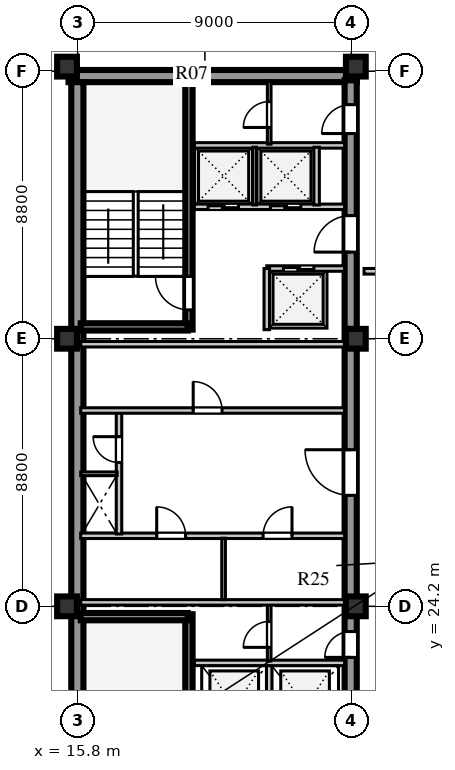
"""IFC4 building model, lengths in metres.
Left out: names, types, materials, properties, quantities, classifications, styles, units other than length and angle.
Written with IfcOpenShell. Run it as: python <this file> out.ifc"""

import sys

from ifc_helpers import new_model, si_unit, direction, frame, frame_2d, origin, origin_2d, place, context, subcontext, project, spatial, rectangle, extrude, element, fill, save


model = new_model("IFC4")
c1 = context("Model", 3, precision=1e-05, world=origin(), true_north=direction((0.0, 1.0)))
c2 = subcontext(c1, "Body", "Model", "MODEL_VIEW")
j1 = project(units=[si_unit("LENGTHUNIT", "METRE"), si_unit("PLANEANGLEUNIT", "RADIAN")], contexts=[c1])
p1 = place(None, origin())
s1 = spatial("IfcSite", under=j1, at=p1, CompositionType="ELEMENT")
p2 = place(p1, origin())
s2 = spatial("IfcBuilding", under=s1, at=p2, CompositionType="ELEMENT")
p3 = place(p2, frame((0.0, 0.0, 342.9)))
s3 = spatial("IfcBuildingStorey", under=s2, at=p3, CompositionType="ELEMENT", Elevation=342.9)
p4 = place(p3, frame((15.5, 41.64, 0.0), z_axis=(0.0, 0.0, 1.0), x_axis=(1.0, 0.0, 0.0)))
e1 = element("IfcWall", 1, at=p4, inside=s3, PredefinedType="SHEAR", context=c2, shape_type="SweptSolid", body=[
    extrude(rectangle(XDim=9.48, YDim=0.4, at=frame_2d((4.74, 0.0))), origin(), (0.0, 0.0, 1.0), 3.55),
])
p5 = place(p3, frame((15.79, 15.81, 0.0), z_axis=(0.0, 0.0, 1.0), x_axis=(0.0, 1.0, 0.0)))
e2 = element("IfcWall", 2, at=p5, inside=s3, PredefinedType="SHEAR", context=c2, shape_type="SweptSolid", body=[
    extrude(rectangle(XDim=25.63, YDim=0.4, at=frame_2d((12.815, 0.0))), origin(), (0.0, 0.0, 1.0), 3.55),
])
p6 = place(p3, frame((24.78, 15.74, 0.0), z_axis=(0.0, 0.0, 1.0), x_axis=(0.0, 1.0, 0.0)))
e3 = element("IfcWall", 3, at=p6, inside=s3, PredefinedType="SHEAR", context=c2, shape_type="SweptSolid", body=[
    extrude(rectangle(XDim=25.76, YDim=0.4, at=frame_2d((12.88, 0.0))), origin(), (0.0, 0.0, 1.0), 3.55),
])
p7 = place(p6, frame((1.61, 0.0, 0.0)))
e4 = element("IfcOpeningElement", 4, at=p7, cuts=e3, PredefinedType="OPENING", context=c2, shape_type="SweptSolid", body=[
    extrude(rectangle(XDim=1.2, YDim=2.1, at=frame_2d((0.6, 1.05))), frame((0.0, 0.21, 0.0), z_axis=(0.0, -1.0, 0.0), x_axis=(1.0, 0.0, 0.0)), (0.0, 0.0, 1.0), 0.42),
])
p8 = place(p6, frame((6.78, 0.0, 0.0)))
e5 = element("IfcOpeningElement", 5, at=p8, cuts=e3, PredefinedType="OPENING", context=c2, shape_type="SweptSolid", body=[
    extrude(rectangle(XDim=0.85, YDim=2.06, at=frame_2d((0.425, 1.03))), frame((0.0, 0.21, 0.0), z_axis=(0.0, -1.0, 0.0), x_axis=(1.0, 0.0, 0.0)), (0.0, 0.0, 1.0), 0.42),
])
p9 = place(p6, frame((12.11, 0.0, 0.0)))
e6 = element("IfcOpeningElement", 6, at=p9, cuts=e3, PredefinedType="OPENING", context=c2, shape_type="SweptSolid", body=[
    extrude(rectangle(XDim=1.5, YDim=2.12, at=frame_2d((0.75, 1.06))), frame((0.0, 0.21, 0.0), z_axis=(0.0, -1.0, 0.0), x_axis=(1.0, 0.0, 0.0)), (0.0, 0.0, 1.0), 0.42),
])
p10 = place(p6, frame((20.11, 0.0, 0.0)))
e7 = element("IfcOpeningElement", 7, at=p10, cuts=e3, PredefinedType="OPENING", context=c2, shape_type="SweptSolid", body=[
    extrude(rectangle(XDim=1.2, YDim=2.12, at=frame_2d((0.6, 1.06))), frame((0.0, 0.21, 0.0), z_axis=(0.0, -1.0, 0.0), x_axis=(1.0, 0.0, 0.0)), (0.0, 0.0, 1.0), 0.42),
])
p11 = place(p6, frame((24.01, 0.0, 0.0)))
e8 = element("IfcOpeningElement", 8, at=p11, cuts=e3, PredefinedType="OPENING", context=c2, shape_type="SweptSolid", body=[
    extrude(rectangle(XDim=0.95, YDim=2.1, at=frame_2d((0.475, 1.05))), frame((0.0, 0.21, 0.0), z_axis=(0.0, -1.0, 0.0), x_axis=(1.0, 0.0, 0.0)), (0.0, 0.0, 1.0), 0.42),
])
for number, where, z_axis, x_axis in (
    (9, (15.45, 24.2, 0.0), (0.0, 0.0, 1.0), (1.0, 0.0, 0.0)),
    (10, (15.45, 33.0, 0.0), (0.0, 0.0, 1.0), (1.0, 0.0, 0.0)),
    (11, (15.45, 41.95, 0.0), (0.0, 0.0, 1.0), (1.0, 0.0, 0.0)),
    (12, (24.95, 24.2, 0.0), (0.0, 0.0, 1.0), (1.0, 0.0, 0.0)),
    (13, (24.95, 33.0, 0.0), (0.0, 0.0, 1.0), (1.0, 0.0, 0.0)),
    (14, (24.95, 41.95, 0.0), (0.0, 0.0, 1.0), (1.0, 0.0, 0.0)),
):
    element("IfcColumn", number, at=place(p3, frame(where, z_axis=z_axis, x_axis=x_axis)), inside=s3, PredefinedType="COLUMN", context=c2, shape_type="SweptSolid", body=[
        extrude(rectangle(XDim=0.65, YDim=0.65, at=origin_2d()), origin(), (0.0, 0.0, 1.0), 3.55),
    ])
p12 = place(p3, frame((19.46, 15.74, 0.0), z_axis=(0.0, 0.0, 1.0), x_axis=(0.0, 1.0, 0.0)))
e15 = element("IfcWall", 15, at=p12, inside=s3, PredefinedType="SHEAR", context=c2, shape_type="SweptSolid", body=[
    extrude(rectangle(XDim=8.2, YDim=0.24, at=frame_2d((4.1, 0.0))), origin(), (0.0, 0.0, 1.0), 3.8),
])
p13 = place(p12, frame((0.45, 0.0, 0.0)))
e16 = element("IfcOpeningElement", 16, at=p13, cuts=e15, PredefinedType="OPENING", context=c2, shape_type="SweptSolid", body=[
    extrude(rectangle(XDim=1.1, YDim=2.1, at=frame_2d((0.55, 1.05))), frame((0.0, 0.13, 0.0), z_axis=(0.0, -1.0, 0.0), x_axis=(1.0, 0.0, 0.0)), (0.0, 0.0, 1.0), 0.26),
])
p14 = place(p3, frame((15.9, 23.86, 0.0), z_axis=(0.0, 0.0, 1.0), x_axis=(1.0, 0.0, 0.0)))
e17 = element("IfcWall", 17, at=p14, inside=s3, PredefinedType="SHEAR", context=c2, shape_type="SweptSolid", body=[
    extrude(rectangle(XDim=3.52, YDim=0.24, at=frame_2d((1.76, 0.0))), origin(), (0.0, 0.0, 1.0), 3.8),
])
p15 = place(p3, frame((22.1, 19.51, 0.0), z_axis=(0.0, 0.0, 1.0), x_axis=(0.0, 1.0, 0.0)))
e18 = element("IfcWall", 18, at=p15, inside=s3, PredefinedType="SOLIDWALL", context=c2, shape_type="SweptSolid", body=[
    extrude(rectangle(XDim=2.74, YDim=0.18, at=frame_2d((1.37, 0.0))), origin(), (0.0, 0.0, 1.0), 3.55),
])
p16 = place(p3, frame((19.64, 22.34, 0.0), z_axis=(0.0, 0.0, 1.0), x_axis=(1.0, 0.0, 0.0)))
e19 = element("IfcWall", 19, at=p16, inside=s3, PredefinedType="SOLIDWALL", context=c2, shape_type="SweptSolid", body=[
    extrude(rectangle(XDim=4.94, YDim=0.18, at=frame_2d((2.47, 0.0))), origin(), (0.0, 0.0, 1.0), 3.55),
])
p17 = place(p3, frame((22.1, 22.4, 0.0), z_axis=(0.0, 0.0, 1.0), x_axis=(0.0, 1.0, 0.0)))
e20 = element("IfcWall", 20, at=p17, inside=s3, PredefinedType="PARTITIONING", context=c2, shape_type="SweptSolid", body=[
    extrude(rectangle(XDim=1.88, YDim=0.12, at=frame_2d((0.94, 0.0))), origin(), (0.0, 0.0, 1.0), 3.55),
])
p18 = place(p17, frame((0.45, 0.0, 0.0)))
e21 = element("IfcOpeningElement", 21, at=p18, cuts=e20, PredefinedType="OPENING", context=c2, shape_type="SweptSolid", body=[
    extrude(rectangle(XDim=0.85, YDim=2.06, at=frame_2d((0.425, 1.03))), frame((0.0, 0.07, 0.0), z_axis=(0.0, -1.0, 0.0), x_axis=(1.0, 0.0, 0.0)), (0.0, 0.0, 1.0), 0.14),
])
p19 = place(p3, frame((15.9, 26.52, 0.0), z_axis=(0.0, 0.0, 1.0), x_axis=(1.0, 0.0, 0.0)))
e22 = element("IfcWall", 22, at=p19, inside=s3, PredefinedType="SOLIDWALL", context=c2, shape_type="SweptSolid", body=[
    extrude(rectangle(XDim=8.68, YDim=0.18, at=frame_2d((4.34, 0.0))), origin(), (0.0, 0.0, 1.0), 3.55),
])
p20 = place(p19, frame((2.5, 0.0, 0.0)))
e23 = element("IfcOpeningElement", 23, at=p20, cuts=e22, PredefinedType="OPENING", context=c2, shape_type="SweptSolid", body=[
    extrude(rectangle(XDim=0.95, YDim=2.1, at=frame_2d((0.475, 1.05))), frame((0.0, 0.1, 0.0), z_axis=(0.0, -1.0, 0.0), x_axis=(1.0, 0.0, 0.0)), (0.0, 0.0, 1.0), 0.2),
])
p21 = place(p19, frame((6.0, 0.0, 0.0)))
e24 = element("IfcOpeningElement", 24, at=p21, cuts=e22, PredefinedType="OPENING", context=c2, shape_type="SweptSolid", body=[
    extrude(rectangle(XDim=0.95, YDim=2.1, at=frame_2d((0.475, 1.05))), frame((0.0, 0.1, 0.0), z_axis=(0.0, -1.0, 0.0), x_axis=(1.0, 0.0, 0.0)), (0.0, 0.0, 1.0), 0.2),
])
p22 = place(p3, frame((15.9, 24.33, 0.0), z_axis=(0.0, 0.0, 1.0), x_axis=(1.0, 0.0, 0.0)))
e25 = element("IfcWall", 25, at=p22, inside=s3, PredefinedType="SOLIDWALL", context=c2, shape_type="SweptSolid", body=[
    extrude(rectangle(XDim=8.68, YDim=0.18, at=frame_2d((4.34, 0.0))), origin(), (0.0, 0.0, 1.0), 2.95),
])
p23 = place(p3, frame((20.6, 24.42, 0.0), z_axis=(0.0, 0.0, 1.0), x_axis=(0.0, 1.0, 0.0)))
e26 = element("IfcWall", 26, at=p23, inside=s3, PredefinedType="PARTITIONING", context=c2, shape_type="SweptSolid", body=[
    extrude(rectangle(XDim=2.02, YDim=0.12, at=frame_2d((1.01, 0.0))), origin(), (0.0, 0.0, 1.0), 3.55),
])
p24 = place(p3, frame((17.16, 26.58, 0.0), z_axis=(0.0, 0.0, 1.0), x_axis=(0.0, 1.0, 0.0)))
e27 = element("IfcWall", 27, at=p24, inside=s3, PredefinedType="SOLIDWALL", context=c2, shape_type="SweptSolid", body=[
    extrude(rectangle(XDim=4.02, YDim=0.18, at=frame_2d((2.01, 0.0))), origin(), (0.0, 0.0, 1.0), 3.55),
])
p25 = place(p24, frame((2.35, 0.0, 0.0)))
e28 = element("IfcOpeningElement", 28, at=p25, cuts=e27, PredefinedType="OPENING", context=c2, shape_type="SweptSolid", body=[
    extrude(rectangle(XDim=0.85, YDim=2.06, at=frame_2d((0.425, 1.03))), frame((0.0, 0.1, 0.0), z_axis=(0.0, -1.0, 0.0), x_axis=(1.0, 0.0, 0.0)), (0.0, 0.0, 1.0), 0.2),
])
p26 = place(p3, frame((15.9, 28.56, 0.0), z_axis=(0.0, 0.0, 1.0), x_axis=(1.0, 0.0, 0.0)))
e29 = element("IfcWall", 29, at=p26, inside=s3, PredefinedType="PARTITIONING", context=c2, shape_type="SweptSolid", body=[
    extrude(rectangle(XDim=1.2, YDim=0.12, at=frame_2d((0.6, 0.0))), origin(), (0.0, 0.0, 1.0), 3.55),
])
p27 = place(p3, frame((15.9, 30.64, 0.0), z_axis=(0.0, 0.0, 1.0), x_axis=(1.0, 0.0, 0.0)))
e30 = element("IfcWall", 30, at=p27, inside=s3, PredefinedType="SOLIDWALL", context=c2, shape_type="SweptSolid", body=[
    extrude(rectangle(XDim=8.68, YDim=0.18, at=frame_2d((4.34, 0.0))), origin(), (0.0, 0.0, 1.0), 3.55),
])
p28 = place(p27, frame((3.7, 0.0, 0.0)))
e31 = element("IfcOpeningElement", 31, at=p28, cuts=e30, PredefinedType="OPENING", context=c2, shape_type="SweptSolid", body=[
    extrude(rectangle(XDim=0.95, YDim=2.1, at=frame_2d((0.475, 1.05))), frame((0.0, 0.1, 0.0), z_axis=(0.0, -1.0, 0.0), x_axis=(1.0, 0.0, 0.0)), (0.0, 0.0, 1.0), 0.2),
])
p29 = place(p3, frame((15.9, 32.82, 0.0), z_axis=(0.0, 0.0, 1.0), x_axis=(1.0, 0.0, 0.0)))
e32 = element("IfcWall", 32, at=p29, inside=s3, PredefinedType="SOLIDWALL", context=c2, shape_type="SweptSolid", body=[
    extrude(rectangle(XDim=8.68, YDim=0.18, at=frame_2d((4.34, 0.0))), origin(), (0.0, 0.0, 1.0), 2.95),
])
p30 = place(p3, frame((19.46, 33.3, 0.0), z_axis=(0.0, 0.0, 1.0), x_axis=(0.0, 1.0, 0.0)))
e33 = element("IfcWall", 33, at=p30, inside=s3, PredefinedType="SHEAR", context=c2, shape_type="SweptSolid", body=[
    extrude(rectangle(XDim=8.18, YDim=0.24, at=frame_2d((4.09, 0.0))), origin(), (0.0, 0.0, 1.0), 3.8),
])
p31 = place(p30, frame((0.65, 0.0, 0.0)))
e34 = element("IfcOpeningElement", 34, at=p31, cuts=e33, PredefinedType="OPENING", context=c2, shape_type="SweptSolid", body=[
    extrude(rectangle(XDim=1.1, YDim=2.1, at=frame_2d((0.55, 1.05))), frame((0.0, 0.13, 0.0), z_axis=(0.0, -1.0, 0.0), x_axis=(1.0, 0.0, 0.0)), (0.0, 0.0, 1.0), 0.26),
])
p32 = place(p3, frame((15.9, 33.39, 0.0), z_axis=(0.0, 0.0, 1.0), x_axis=(1.0, 0.0, 0.0)))
e35 = element("IfcWall", 35, at=p32, inside=s3, PredefinedType="SHEAR", context=c2, shape_type="SweptSolid", body=[
    extrude(rectangle(XDim=3.52, YDim=0.24, at=frame_2d((1.76, 0.0))), origin(), (0.0, 0.0, 1.0), 3.8),
])
p33 = place(p3, frame((22.02, 35.31, 0.0), z_axis=(0.0, 0.0, 1.0), x_axis=(1.0, 0.0, 0.0)))
e36 = element("IfcWall", 36, at=p33, inside=s3, PredefinedType="SOLIDWALL", context=c2, shape_type="SweptSolid", body=[
    extrude(rectangle(XDim=2.56, YDim=0.18, at=frame_2d((1.28, 0.0))), origin(), (0.0, 0.0, 1.0), 3.55),
])
p34 = place(p33, frame((0.55, 0.0, 0.0)))
e37 = element("IfcOpeningElement", 37, at=p34, cuts=e36, PredefinedType="OPENING", context=c2, shape_type="SweptSolid", body=[
    extrude(rectangle(XDim=1.0, YDim=2.1, at=frame_2d((0.5, 1.05))), frame((0.0, 0.1, 0.0), z_axis=(0.0, -1.0, 0.0), x_axis=(1.0, 0.0, 0.0)), (0.0, 0.0, 1.0), 0.2),
])
p35 = place(p3, frame((22.02, 33.3, 0.0), z_axis=(0.0, 0.0, 1.0), x_axis=(0.0, 1.0, 0.0)))
e38 = element("IfcWall", 38, at=p35, inside=s3, PredefinedType="SOLIDWALL", context=c2, shape_type="SweptSolid", body=[
    extrude(rectangle(XDim=2.01, YDim=0.18, at=frame_2d((1.005, 0.0))), origin(), (0.0, 0.0, 1.0), 3.55),
])
p36 = place(p3, frame((19.64, 37.34, 0.0), z_axis=(0.0, 0.0, 1.0), x_axis=(1.0, 0.0, 0.0)))
e39 = element("IfcWall", 39, at=p36, inside=s3, PredefinedType="SOLIDWALL", context=c2, shape_type="SweptSolid", body=[
    extrude(rectangle(XDim=4.94, YDim=0.18, at=frame_2d((2.47, 0.0))), origin(), (0.0, 0.0, 1.0), 3.55),
])
p37 = place(p36, frame((0.45, 0.0, 0.0)))
e40 = element("IfcOpeningElement", 40, at=p37, cuts=e39, PredefinedType="OPENING", context=c2, shape_type="SweptSolid", body=[
    extrude(rectangle(XDim=1.0, YDim=2.1, at=frame_2d((0.5, 1.05))), frame((0.0, 0.1, 0.0), z_axis=(0.0, -1.0, 0.0), x_axis=(1.0, 0.0, 0.0)), (0.0, 0.0, 1.0), 0.2),
])
p38 = place(p36, frame((2.5, 0.0, 0.0)))
e41 = element("IfcOpeningElement", 41, at=p38, cuts=e39, PredefinedType="OPENING", context=c2, shape_type="SweptSolid", body=[
    extrude(rectangle(XDim=1.0, YDim=2.1, at=frame_2d((0.5, 1.05))), frame((0.0, 0.1, 0.0), z_axis=(0.0, -1.0, 0.0), x_axis=(1.0, 0.0, 0.0)), (0.0, 0.0, 1.0), 0.2),
])
p39 = place(p3, frame((19.64, 39.36, 0.0), z_axis=(0.0, 0.0, 1.0), x_axis=(1.0, 0.0, 0.0)))
e42 = element("IfcWall", 42, at=p39, inside=s3, PredefinedType="SOLIDWALL", context=c2, shape_type="SweptSolid", body=[
    extrude(rectangle(XDim=4.94, YDim=0.18, at=frame_2d((2.47, 0.0))), origin(), (0.0, 0.0, 1.0), 3.55),
])
p40 = place(p3, frame((21.62, 37.4, 0.0), z_axis=(0.0, 0.0, 1.0), x_axis=(0.0, 1.0, 0.0)))
e43 = element("IfcWall", 43, at=p40, inside=s3, PredefinedType="PARTITIONING", context=c2, shape_type="SweptSolid", body=[
    extrude(rectangle(XDim=1.9, YDim=0.12, at=frame_2d((0.95, 0.0))), origin(), (0.0, 0.0, 1.0), 3.55),
])
p41 = place(p3, frame((23.66, 37.4, 0.0), z_axis=(0.0, 0.0, 1.0), x_axis=(0.0, 1.0, 0.0)))
e44 = element("IfcWall", 44, at=p41, inside=s3, PredefinedType="SOLIDWALL", context=c2, shape_type="SweptSolid", body=[
    extrude(rectangle(XDim=1.9, YDim=0.18, at=frame_2d((0.95, 0.0))), origin(), (0.0, 0.0, 1.0), 3.55),
])
p42 = place(p3, frame((22.1, 39.4, 0.0), z_axis=(0.0, 0.0, 1.0), x_axis=(0.0, 1.0, 0.0)))
e45 = element("IfcWall", 45, at=p42, inside=s3, PredefinedType="PARTITIONING", context=c2, shape_type="SweptSolid", body=[
    extrude(rectangle(XDim=2.08, YDim=0.12, at=frame_2d((1.04, 0.0))), origin(), (0.0, 0.0, 1.0), 3.55),
])
p43 = place(p42, frame((0.55, 0.0, 0.0)))
e46 = element("IfcOpeningElement", 46, at=p43, cuts=e45, PredefinedType="OPENING", context=c2, shape_type="SweptSolid", body=[
    extrude(rectangle(XDim=0.85, YDim=2.06, at=frame_2d((0.425, 1.03))), frame((0.0, 0.07, 0.0), z_axis=(0.0, -1.0, 0.0), x_axis=(1.0, 0.0, 0.0)), (0.0, 0.0, 1.0), 0.14),
])
p44 = place(p3, frame((25.22, 35.22, 0.0), z_axis=(0.0, 0.0, 1.0), x_axis=(1.0, 0.0, 0.0)))
e47 = element("IfcWall", 47, at=p44, inside=s3, PredefinedType="SOLIDWALL", context=c2, shape_type="SweptSolid", body=[
    extrude(rectangle(XDim=9.5, YDim=0.185, at=frame_2d((4.75, 0.0))), origin(), (0.0, 0.0, 1.0), 3.55),
])
p45 = place(p44, frame((2.4, 0.0, 0.0)))
e48 = element("IfcOpeningElement", 48, at=p45, cuts=e47, PredefinedType="OPENING", context=c2, shape_type="SweptSolid", body=[
    extrude(rectangle(XDim=0.95, YDim=2.08, at=frame_2d((0.475, 1.04))), frame((0.0, 0.103, 0.0), z_axis=(0.0, -1.0, 0.0), x_axis=(1.0, 0.0, 0.0)), (0.0, 0.0, 1.0), 0.205),
])
p46 = place(p44, frame((6.2, 0.0, 0.0)))
e49 = element("IfcOpeningElement", 49, at=p46, cuts=e47, PredefinedType="OPENING", context=c2, shape_type="SweptSolid", body=[
    extrude(rectangle(XDim=0.95, YDim=2.08, at=frame_2d((0.475, 1.04))), frame((0.0, 0.103, 0.0), z_axis=(0.0, -1.0, 0.0), x_axis=(1.0, 0.0, 0.0)), (0.0, 0.0, 1.0), 0.205),
])
p47 = place(p18, origin())
e50 = element("IfcDoor", 50, at=p47, inside=s3, OperationType="SINGLE_SWING_LEFT", PredefinedType="DOOR", context=c2, shape_type="SweptSolid", body=[
    extrude(rectangle(XDim=0.85, YDim=2.06, at=frame_2d((0.425, 1.03))), frame((0.0, 0.025, 0.0), z_axis=(0.0, -1.0, 0.0), x_axis=(1.0, 0.0, 0.0)), (0.0, 0.0, 1.0), 0.05),
])
fill(e21, e50)
p48 = place(p8, frame((0.85, 0.0, 0.0), z_axis=(0.0, 0.0, 1.0), x_axis=(-1.0, 0.0, 0.0)))
e51 = element("IfcDoor", 51, at=p48, inside=s3, OperationType="SINGLE_SWING_RIGHT", PredefinedType="DOOR", context=c2, shape_type="SweptSolid", body=[
    extrude(rectangle(XDim=0.85, YDim=2.06, at=frame_2d((0.425, 1.03))), frame((0.0, 0.025, 0.0), z_axis=(0.0, -1.0, 0.0), x_axis=(1.0, 0.0, 0.0)), (0.0, 0.0, 1.0), 0.05),
])
fill(e5, e51)
p49 = place(p20, origin())
e52 = element("IfcDoor", 52, at=p49, inside=s3, OperationType="SINGLE_SWING_LEFT", PredefinedType="DOOR", context=c2, shape_type="SweptSolid", body=[
    extrude(rectangle(XDim=0.95, YDim=2.1, at=frame_2d((0.475, 1.05))), frame((0.0, 0.025, 0.0), z_axis=(0.0, -1.0, 0.0), x_axis=(1.0, 0.0, 0.0)), (0.0, 0.0, 1.0), 0.05),
])
fill(e23, e52)
p50 = place(p21, origin())
e53 = element("IfcDoor", 53, at=p50, inside=s3, OperationType="SINGLE_SWING_RIGHT", PredefinedType="DOOR", context=c2, shape_type="SweptSolid", body=[
    extrude(rectangle(XDim=0.95, YDim=2.1, at=frame_2d((0.475, 1.05))), frame((0.0, 0.025, 0.0), z_axis=(0.0, -1.0, 0.0), x_axis=(1.0, 0.0, 0.0)), (0.0, 0.0, 1.0), 0.05),
])
fill(e24, e53)
p51 = place(p25, origin())
e54 = element("IfcDoor", 54, at=p51, inside=s3, OperationType="SINGLE_SWING_RIGHT", PredefinedType="DOOR", context=c2, shape_type="SweptSolid", body=[
    extrude(rectangle(XDim=0.85, YDim=2.06, at=frame_2d((0.425, 1.03))), frame((0.0, 0.025, 0.0), z_axis=(0.0, -1.0, 0.0), x_axis=(1.0, 0.0, 0.0)), (0.0, 0.0, 1.0), 0.05),
])
fill(e28, e54)
p52 = place(p9, frame((1.5, 0.0, 0.0), z_axis=(0.0, 0.0, 1.0), x_axis=(-1.0, 0.0, 0.0)))
e55 = element("IfcDoor", 55, at=p52, inside=s3, OperationType="SINGLE_SWING_LEFT", PredefinedType="DOOR", context=c2, shape_type="SweptSolid", body=[
    extrude(rectangle(XDim=1.5, YDim=2.12, at=frame_2d((0.75, 1.06))), frame((0.0, 0.025, 0.0), z_axis=(0.0, -1.0, 0.0), x_axis=(1.0, 0.0, 0.0)), (0.0, 0.0, 1.0), 0.05),
])
fill(e6, e55)
p53 = place(p28, frame((0.95, 0.0, 0.0), z_axis=(0.0, 0.0, 1.0), x_axis=(-1.0, 0.0, 0.0)))
e56 = element("IfcDoor", 56, at=p53, inside=s3, OperationType="SINGLE_SWING_RIGHT", PredefinedType="DOOR", context=c2, shape_type="SweptSolid", body=[
    extrude(rectangle(XDim=0.95, YDim=2.1, at=frame_2d((0.475, 1.05))), frame((0.0, 0.025, 0.0), z_axis=(0.0, -1.0, 0.0), x_axis=(1.0, 0.0, 0.0)), (0.0, 0.0, 1.0), 0.05),
])
fill(e31, e56)
p54 = place(p31, origin())
e57 = element("IfcDoor", 57, at=p54, inside=s3, OperationType="SINGLE_SWING_RIGHT", PredefinedType="DOOR", context=c2, shape_type="SweptSolid", body=[
    extrude(rectangle(XDim=1.1, YDim=2.1, at=frame_2d((0.55, 1.05))), frame((0.0, 0.025, 0.0), z_axis=(0.0, -1.0, 0.0), x_axis=(1.0, 0.0, 0.0)), (0.0, 0.0, 1.0), 0.05),
])
fill(e34, e57)
p55 = place(p10, frame((1.2, 0.0, 0.0), z_axis=(0.0, 0.0, 1.0), x_axis=(-1.0, 0.0, 0.0)))
e58 = element("IfcDoor", 58, at=p55, inside=s3, OperationType="SINGLE_SWING_RIGHT", PredefinedType="DOOR", context=c2, shape_type="SweptSolid", body=[
    extrude(rectangle(XDim=1.2, YDim=2.12, at=frame_2d((0.6, 1.06))), frame((0.0, 0.025, 0.0), z_axis=(0.0, -1.0, 0.0), x_axis=(1.0, 0.0, 0.0)), (0.0, 0.0, 1.0), 0.05),
])
fill(e7, e58)
p56 = place(p37, frame((1.0, 0.0, 0.0), z_axis=(0.0, 0.0, 1.0), x_axis=(-1.0, 0.0, 0.0)))
e59 = element("IfcDoor", 59, at=p56, inside=s3, OperationType="DOUBLE_DOOR_SLIDING", PredefinedType="DOOR", context=c2, shape_type="SweptSolid", body=[
    extrude(rectangle(XDim=1.0, YDim=2.1, at=frame_2d((0.5, 1.05))), frame((0.0, 0.025, 0.0), z_axis=(0.0, -1.0, 0.0), x_axis=(1.0, 0.0, 0.0)), (0.0, 0.0, 1.0), 0.05),
])
fill(e40, e59)
p57 = place(p38, frame((1.0, 0.0, 0.0), z_axis=(0.0, 0.0, 1.0), x_axis=(-1.0, 0.0, 0.0)))
e60 = element("IfcDoor", 60, at=p57, inside=s3, OperationType="DOUBLE_DOOR_SLIDING", PredefinedType="DOOR", context=c2, shape_type="SweptSolid", body=[
    extrude(rectangle(XDim=1.0, YDim=2.1, at=frame_2d((0.5, 1.05))), frame((0.0, 0.025, 0.0), z_axis=(0.0, -1.0, 0.0), x_axis=(1.0, 0.0, 0.0)), (0.0, 0.0, 1.0), 0.05),
])
fill(e41, e60)
p58 = place(p34, origin())
e61 = element("IfcDoor", 61, at=p58, inside=s3, OperationType="DOUBLE_DOOR_SLIDING", PredefinedType="DOOR", context=c2, shape_type="SweptSolid", body=[
    extrude(rectangle(XDim=1.0, YDim=2.1, at=frame_2d((0.5, 1.05))), frame((0.0, 0.025, 0.0), z_axis=(0.0, -1.0, 0.0), x_axis=(1.0, 0.0, 0.0)), (0.0, 0.0, 1.0), 0.05),
])
fill(e37, e61)
p59 = place(p43, origin())
e62 = element("IfcDoor", 62, at=p59, inside=s3, OperationType="SINGLE_SWING_LEFT", PredefinedType="DOOR", context=c2, shape_type="SweptSolid", body=[
    extrude(rectangle(XDim=0.85, YDim=2.06, at=frame_2d((0.425, 1.03))), frame((0.0, 0.025, 0.0), z_axis=(0.0, -1.0, 0.0), x_axis=(1.0, 0.0, 0.0)), (0.0, 0.0, 1.0), 0.05),
])
fill(e46, e62)
p60 = place(p11, frame((0.95, 0.0, 0.0), z_axis=(0.0, 0.0, 1.0), x_axis=(-1.0, 0.0, 0.0)))
e63 = element("IfcDoor", 63, at=p60, inside=s3, OperationType="SINGLE_SWING_RIGHT", PredefinedType="DOOR", context=c2, shape_type="SweptSolid", body=[
    extrude(rectangle(XDim=0.95, YDim=2.1, at=frame_2d((0.475, 1.05))), frame((0.0, 0.025, 0.0), z_axis=(0.0, -1.0, 0.0), x_axis=(1.0, 0.0, 0.0)), (0.0, 0.0, 1.0), 0.05),
])
fill(e8, e63)
save(model, sys.argv[1])
